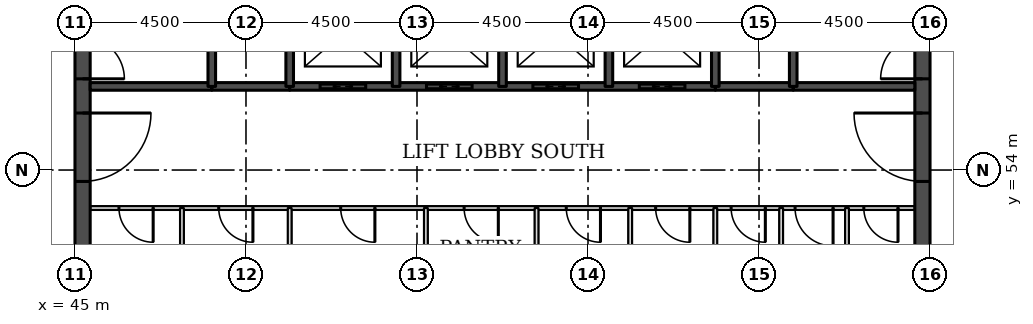
"""IFC4 building model, lengths in metres.
Left out: names, types, materials, properties, quantities, classifications, styles, units other than length and angle.
Written with IfcOpenShell. Run it as: python <this file> out.ifc"""

import sys

from ifc_helpers import new_model, si_unit, direction, frame, frame_2d, origin, place, context, subcontext, project, spatial, rectangle, extrude, element, fill, save


model = new_model("IFC4")
c1 = context("Model", 3, precision=1e-05, world=origin(), true_north=direction((0.0, 1.0)))
c2 = subcontext(c1, "Body", "Model", "MODEL_VIEW")
j1 = project(units=[si_unit("LENGTHUNIT", "METRE"), si_unit("PLANEANGLEUNIT", "RADIAN")], contexts=[c1])
p1 = place(None, origin())
s1 = spatial("IfcSite", under=j1, at=p1, CompositionType="ELEMENT")
p2 = place(p1, origin())
s2 = spatial("IfcBuilding", under=s1, at=p2, CompositionType="ELEMENT")
p3 = place(p2, frame((0.0, 0.0, 162.5)))
s3 = spatial("IfcBuildingStorey", under=s2, at=p3, CompositionType="ELEMENT", Elevation=162.5)
p4 = place(p3, frame((45.2, 49.5, 0.0), z_axis=(0.0, 0.0, 1.0), x_axis=(0.0, 1.0, 0.0)))
e1 = element("IfcWall", 1, at=p4, inside=s3, PredefinedType="SHEAR", context=c2, shape_type="SweptSolid", body=[
    extrude(rectangle(XDim=22.5, YDim=0.4, at=frame_2d((11.25, 0.0))), origin(), (0.0, 0.0, 1.0), 3.7),
])
p5 = place(p4, frame((4.2, 0.0, 0.0)))
e2 = element("IfcOpeningElement", 2, at=p5, cuts=e1, PredefinedType="OPENING", context=c2, shape_type="SweptSolid", body=[
    extrude(rectangle(XDim=1.8, YDim=2.1, at=frame_2d((0.9, 1.05))), frame((0.0, 0.21, 0.0), z_axis=(0.0, -1.0, 0.0), x_axis=(1.0, 0.0, 0.0)), (0.0, 0.0, 1.0), 0.42),
])
p6 = place(p4, frame((6.9, 0.0, 0.0)))
e3 = element("IfcOpeningElement", 3, at=p6, cuts=e1, PredefinedType="OPENING", context=c2, shape_type="SweptSolid", body=[
    extrude(rectangle(XDim=1.1, YDim=2.1, at=frame_2d((0.55, 1.05))), frame((0.0, 0.21, 0.0), z_axis=(0.0, -1.0, 0.0), x_axis=(1.0, 0.0, 0.0)), (0.0, 0.0, 1.0), 0.42),
])
p7 = place(p4, frame((13.6, 0.0, 0.0)))
e4 = element("IfcOpeningElement", 4, at=p7, cuts=e1, PredefinedType="OPENING", context=c2, shape_type="SweptSolid", body=[
    extrude(rectangle(XDim=1.1, YDim=2.1, at=frame_2d((0.55, 1.05))), frame((0.0, 0.21, 0.0), z_axis=(0.0, -1.0, 0.0), x_axis=(1.0, 0.0, 0.0)), (0.0, 0.0, 1.0), 0.42),
])
p8 = place(p4, frame((16.5, 0.0, 0.0)))
e5 = element("IfcOpeningElement", 5, at=p8, cuts=e1, PredefinedType="OPENING", context=c2, shape_type="SweptSolid", body=[
    extrude(rectangle(XDim=1.8, YDim=2.1, at=frame_2d((0.9, 1.05))), frame((0.0, 0.21, 0.0), z_axis=(0.0, -1.0, 0.0), x_axis=(1.0, 0.0, 0.0)), (0.0, 0.0, 1.0), 0.42),
])
p9 = place(p3, frame((67.3, 49.5, 0.0), z_axis=(0.0, 0.0, 1.0), x_axis=(0.0, 1.0, 0.0)))
e6 = element("IfcWall", 6, at=p9, inside=s3, PredefinedType="SHEAR", context=c2, shape_type="SweptSolid", body=[
    extrude(rectangle(XDim=22.5, YDim=0.4, at=frame_2d((11.25, 0.0))), origin(), (0.0, 0.0, 1.0), 3.7),
])
p10 = place(p9, frame((4.2, 0.0, 0.0)))
e7 = element("IfcOpeningElement", 7, at=p10, cuts=e6, PredefinedType="OPENING", context=c2, shape_type="SweptSolid", body=[
    extrude(rectangle(XDim=1.8, YDim=2.1, at=frame_2d((0.9, 1.05))), frame((0.0, 0.21, 0.0), z_axis=(0.0, -1.0, 0.0), x_axis=(1.0, 0.0, 0.0)), (0.0, 0.0, 1.0), 0.42),
])
p11 = place(p9, frame((6.9, 0.0, 0.0)))
e8 = element("IfcOpeningElement", 8, at=p11, cuts=e6, PredefinedType="OPENING", context=c2, shape_type="SweptSolid", body=[
    extrude(rectangle(XDim=1.1, YDim=2.1, at=frame_2d((0.55, 1.05))), frame((0.0, 0.21, 0.0), z_axis=(0.0, -1.0, 0.0), x_axis=(1.0, 0.0, 0.0)), (0.0, 0.0, 1.0), 0.42),
])
p12 = place(p9, frame((13.6, 0.0, 0.0)))
e9 = element("IfcOpeningElement", 9, at=p12, cuts=e6, PredefinedType="OPENING", context=c2, shape_type="SweptSolid", body=[
    extrude(rectangle(XDim=1.1, YDim=2.1, at=frame_2d((0.55, 1.05))), frame((0.0, 0.21, 0.0), z_axis=(0.0, -1.0, 0.0), x_axis=(1.0, 0.0, 0.0)), (0.0, 0.0, 1.0), 0.42),
])
p13 = place(p9, frame((16.5, 0.0, 0.0)))
e10 = element("IfcOpeningElement", 10, at=p13, cuts=e6, PredefinedType="OPENING", context=c2, shape_type="SweptSolid", body=[
    extrude(rectangle(XDim=1.8, YDim=2.1, at=frame_2d((0.9, 1.05))), frame((0.0, 0.21, 0.0), z_axis=(0.0, -1.0, 0.0), x_axis=(1.0, 0.0, 0.0)), (0.0, 0.0, 1.0), 0.42),
])
p14 = place(p3, frame((45.4, 53.0, 0.0), z_axis=(0.0, 0.0, 1.0), x_axis=(1.0, 0.0, 0.0)))
e11 = element("IfcWall", 11, at=p14, inside=s3, PredefinedType="PARTITIONING", context=c2, shape_type="SweptSolid", body=[
    extrude(rectangle(XDim=21.7, YDim=0.1, at=frame_2d((10.85, 0.0))), origin(), (0.0, 0.0, 1.0), 3.55),
])
p15 = place(p14, frame((20.357, 0.0, 0.0)))
e12 = element("IfcOpeningElement", 12, at=p15, cuts=e11, PredefinedType="OPENING", context=c2, shape_type="SweptSolid", body=[
    extrude(rectangle(XDim=0.9, YDim=2.1, at=frame_2d((0.45, 1.05))), frame((0.0, 0.06, 0.0), z_axis=(0.0, -1.0, 0.0), x_axis=(1.0, 0.0, 0.0)), (0.0, 0.0, 1.0), 0.12),
])
p16 = place(p14, frame((18.549, 0.0, 0.0)))
e13 = element("IfcOpeningElement", 13, at=p16, cuts=e11, PredefinedType="OPENING", context=c2, shape_type="SweptSolid", body=[
    extrude(rectangle(XDim=1.0, YDim=2.1, at=frame_2d((0.5, 1.05))), frame((0.0, 0.06, 0.0), z_axis=(0.0, -1.0, 0.0), x_axis=(1.0, 0.0, 0.0)), (0.0, 0.0, 1.0), 0.12),
])
p17 = place(p14, frame((16.866, 0.0, 0.0)))
e14 = element("IfcOpeningElement", 14, at=p17, cuts=e11, PredefinedType="OPENING", context=c2, shape_type="SweptSolid", body=[
    extrude(rectangle(XDim=0.9, YDim=2.1, at=frame_2d((0.45, 1.05))), frame((0.0, 0.06, 0.0), z_axis=(0.0, -1.0, 0.0), x_axis=(1.0, 0.0, 0.0)), (0.0, 0.0, 1.0), 0.12),
])
p18 = place(p14, frame((0.758, 0.0, 0.0)))
e15 = element("IfcOpeningElement", 15, at=p18, cuts=e11, PredefinedType="OPENING", context=c2, shape_type="SweptSolid", body=[
    extrude(rectangle(XDim=0.9, YDim=2.1, at=frame_2d((0.45, 1.05))), frame((0.0, 0.06, 0.0), z_axis=(0.0, -1.0, 0.0), x_axis=(1.0, 0.0, 0.0)), (0.0, 0.0, 1.0), 0.12),
])
p19 = place(p14, frame((3.383, 0.0, 0.0)))
e16 = element("IfcOpeningElement", 16, at=p19, cuts=e11, PredefinedType="OPENING", context=c2, shape_type="SweptSolid", body=[
    extrude(rectangle(XDim=0.9, YDim=2.1, at=frame_2d((0.45, 1.05))), frame((0.0, 0.06, 0.0), z_axis=(0.0, -1.0, 0.0), x_axis=(1.0, 0.0, 0.0)), (0.0, 0.0, 1.0), 0.12),
])
p20 = place(p14, frame((6.592, 0.0, 0.0)))
e17 = element("IfcOpeningElement", 17, at=p20, cuts=e11, PredefinedType="OPENING", context=c2, shape_type="SweptSolid", body=[
    extrude(rectangle(XDim=0.9, YDim=2.1, at=frame_2d((0.45, 1.05))), frame((0.0, 0.06, 0.0), z_axis=(0.0, -1.0, 0.0), x_axis=(1.0, 0.0, 0.0)), (0.0, 0.0, 1.0), 0.12),
])
p21 = place(p14, frame((9.84, 0.0, 0.0)))
e18 = element("IfcOpeningElement", 18, at=p21, cuts=e11, PredefinedType="OPENING", context=c2, shape_type="SweptSolid", body=[
    extrude(rectangle(XDim=0.9, YDim=2.1, at=frame_2d((0.45, 1.05))), frame((0.0, 0.06, 0.0), z_axis=(0.0, -1.0, 0.0), x_axis=(1.0, 0.0, 0.0)), (0.0, 0.0, 1.0), 0.12),
])
p22 = place(p14, frame((12.528, 0.0, 0.0)))
e19 = element("IfcOpeningElement", 19, at=p22, cuts=e11, PredefinedType="OPENING", context=c2, shape_type="SweptSolid", body=[
    extrude(rectangle(XDim=0.9, YDim=2.1, at=frame_2d((0.45, 1.05))), frame((0.0, 0.06, 0.0), z_axis=(0.0, -1.0, 0.0), x_axis=(1.0, 0.0, 0.0)), (0.0, 0.0, 1.0), 0.12),
])
p23 = place(p14, frame((14.88, 0.0, 0.0)))
e20 = element("IfcOpeningElement", 20, at=p23, cuts=e11, PredefinedType="OPENING", context=c2, shape_type="SweptSolid", body=[
    extrude(rectangle(XDim=0.9, YDim=2.1, at=frame_2d((0.45, 1.05))), frame((0.0, 0.06, 0.0), z_axis=(0.0, -1.0, 0.0), x_axis=(1.0, 0.0, 0.0)), (0.0, 0.0, 1.0), 0.12),
])
for number, where, z_axis, x_axis in (
    (21, (48.6, 56.2, 0.0), (0.0, 0.0, 1.0), (1.0, 0.0, 0.0)),
    (22, (61.85, 56.2, 0.0), (0.0, 0.0, 1.0), (1.0, 0.0, 0.0)),
):
    element("IfcWall", number, at=place(p3, frame(where, z_axis=z_axis, x_axis=x_axis)), inside=s3, PredefinedType="SOLIDWALL", context=c2, shape_type="SweptSolid", body=[
        extrude(rectangle(XDim=2.05, YDim=0.2, at=frame_2d((1.025, 0.0))), origin(), (0.0, 0.0, 1.0), 3.55),
    ])
p24 = place(p3, frame((45.4, 56.2, 0.0), z_axis=(0.0, 0.0, 1.0), x_axis=(1.0, 0.0, 0.0)))
e23 = element("IfcWall", 23, at=p24, inside=s3, PredefinedType="SOLIDWALL", context=c2, shape_type="SweptSolid", body=[
    extrude(rectangle(XDim=3.2, YDim=0.2, at=frame_2d((1.6, 0.0))), origin(), (0.0, 0.0, 1.0), 3.55),
])
p25 = place(p3, frame((50.65, 56.2, 0.0), z_axis=(0.0, 0.0, 1.0), x_axis=(1.0, 0.0, 0.0)))
e24 = element("IfcWall", 24, at=p25, inside=s3, PredefinedType="SOLIDWALL", context=c2, shape_type="SweptSolid", body=[
    extrude(rectangle(XDim=11.2, YDim=0.2, at=frame_2d((5.6, 0.0))), origin(), (0.0, 0.0, 1.0), 3.55),
])
p26 = place(p25, frame((0.8, 0.0, 0.0)))
e25 = element("IfcOpeningElement", 25, at=p26, cuts=e24, PredefinedType="OPENING", context=c2, shape_type="SweptSolid", body=[
    extrude(rectangle(XDim=1.2, YDim=2.1, at=frame_2d((0.6, 1.05))), frame((0.0, 0.11, 0.0), z_axis=(0.0, -1.0, 0.0), x_axis=(1.0, 0.0, 0.0)), (0.0, 0.0, 1.0), 0.22),
])
p27 = place(p25, frame((3.6, 0.0, 0.0)))
e26 = element("IfcOpeningElement", 26, at=p27, cuts=e24, PredefinedType="OPENING", context=c2, shape_type="SweptSolid", body=[
    extrude(rectangle(XDim=1.2, YDim=2.1, at=frame_2d((0.6, 1.05))), frame((0.0, 0.11, 0.0), z_axis=(0.0, -1.0, 0.0), x_axis=(1.0, 0.0, 0.0)), (0.0, 0.0, 1.0), 0.22),
])
p28 = place(p25, frame((6.4, 0.0, 0.0)))
e27 = element("IfcOpeningElement", 27, at=p28, cuts=e24, PredefinedType="OPENING", context=c2, shape_type="SweptSolid", body=[
    extrude(rectangle(XDim=1.2, YDim=2.1, at=frame_2d((0.6, 1.05))), frame((0.0, 0.11, 0.0), z_axis=(0.0, -1.0, 0.0), x_axis=(1.0, 0.0, 0.0)), (0.0, 0.0, 1.0), 0.22),
])
p29 = place(p25, frame((9.2, 0.0, 0.0)))
e28 = element("IfcOpeningElement", 28, at=p29, cuts=e24, PredefinedType="OPENING", context=c2, shape_type="SweptSolid", body=[
    extrude(rectangle(XDim=1.2, YDim=2.1, at=frame_2d((0.6, 1.05))), frame((0.0, 0.11, 0.0), z_axis=(0.0, -1.0, 0.0), x_axis=(1.0, 0.0, 0.0)), (0.0, 0.0, 1.0), 0.22),
])
p30 = place(p3, frame((63.9, 56.2, 0.0), z_axis=(0.0, 0.0, 1.0), x_axis=(1.0, 0.0, 0.0)))
e29 = element("IfcWall", 29, at=p30, inside=s3, PredefinedType="SOLIDWALL", context=c2, shape_type="SweptSolid", body=[
    extrude(rectangle(XDim=3.2, YDim=0.2, at=frame_2d((1.6, 0.0))), origin(), (0.0, 0.0, 1.0), 3.55),
])
p31 = place(p3, frame((47.815, 49.9, 0.0), z_axis=(0.0, 0.0, 1.0), x_axis=(0.0, 1.0, 0.0)))
e30 = element("IfcWall", 30, at=p31, inside=s3, PredefinedType="PARTITIONING", context=c2, shape_type="SweptSolid", body=[
    extrude(rectangle(XDim=3.1, YDim=0.1, at=frame_2d((1.55, 0.0))), origin(), (0.0, 0.0, 1.0), 3.55),
])
p32 = place(p3, frame((48.6, 56.2, 0.0), z_axis=(0.0, 0.0, 1.0), x_axis=(0.0, 1.0, 0.0)))
e31 = element("IfcWall", 31, at=p32, inside=s3, PredefinedType="SOLIDWALL", context=c2, shape_type="SweptSolid", body=[
    extrude(rectangle(XDim=5.8, YDim=0.2, at=frame_2d((2.9, 0.0))), origin(), (0.0, 0.0, 1.0), 3.55),
])
p33 = place(p3, frame((50.65, 49.9, 0.0), z_axis=(0.0, 0.0, 1.0), x_axis=(0.0, 1.0, 0.0)))
e32 = element("IfcWall", 32, at=p33, inside=s3, PredefinedType="PARTITIONING", context=c2, shape_type="SweptSolid", body=[
    extrude(rectangle(XDim=3.1, YDim=0.1, at=frame_2d((1.55, 0.0))), origin(), (0.0, 0.0, 1.0), 3.55),
])
for number, where, z_axis, x_axis in (
    (33, (50.65, 56.2, 0.0), (0.0, 0.0, 1.0), (0.0, 1.0, 0.0)),
    (34, (53.45, 56.2, 0.0), (0.0, 0.0, 1.0), (0.0, 1.0, 0.0)),
):
    element("IfcWall", number, at=place(p3, frame(where, z_axis=z_axis, x_axis=x_axis)), inside=s3, PredefinedType="SOLIDWALL", context=c2, shape_type="SweptSolid", body=[
        extrude(rectangle(XDim=2.8, YDim=0.2, at=frame_2d((1.4, 0.0))), origin(), (0.0, 0.0, 1.0), 3.55),
    ])
p34 = place(p3, frame((54.234, 49.9, 0.0), z_axis=(0.0, 0.0, 1.0), x_axis=(0.0, 1.0, 0.0)))
e35 = element("IfcWall", 35, at=p34, inside=s3, PredefinedType="PARTITIONING", context=c2, shape_type="SweptSolid", body=[
    extrude(rectangle(XDim=3.1, YDim=0.1, at=frame_2d((1.55, 0.0))), origin(), (0.0, 0.0, 1.0), 3.55),
])
p35 = place(p3, frame((56.25, 56.2, 0.0), z_axis=(0.0, 0.0, 1.0), x_axis=(0.0, 1.0, 0.0)))
e36 = element("IfcWall", 36, at=p35, inside=s3, PredefinedType="SOLIDWALL", context=c2, shape_type="SweptSolid", body=[
    extrude(rectangle(XDim=2.8, YDim=0.2, at=frame_2d((1.4, 0.0))), origin(), (0.0, 0.0, 1.0), 3.55),
])
p36 = place(p3, frame((57.146, 49.9, 0.0), z_axis=(0.0, 0.0, 1.0), x_axis=(0.0, 1.0, 0.0)))
e37 = element("IfcWall", 37, at=p36, inside=s3, PredefinedType="PARTITIONING", context=c2, shape_type="SweptSolid", body=[
    extrude(rectangle(XDim=3.1, YDim=0.1, at=frame_2d((1.55, 0.0))), origin(), (0.0, 0.0, 1.0), 3.55),
])
p37 = place(p3, frame((59.05, 56.2, 0.0), z_axis=(0.0, 0.0, 1.0), x_axis=(0.0, 1.0, 0.0)))
e38 = element("IfcWall", 38, at=p37, inside=s3, PredefinedType="SOLIDWALL", context=c2, shape_type="SweptSolid", body=[
    extrude(rectangle(XDim=2.8, YDim=0.2, at=frame_2d((1.4, 0.0))), origin(), (0.0, 0.0, 1.0), 3.55),
])
for number, where, z_axis, x_axis in (
    (39, (59.61, 49.9, 0.0), (0.0, 0.0, 1.0), (0.0, 1.0, 0.0)),
    (40, (61.85, 49.9, 0.0), (0.0, 0.0, 1.0), (0.0, 1.0, 0.0)),
):
    element("IfcWall", number, at=place(p3, frame(where, z_axis=z_axis, x_axis=x_axis)), inside=s3, PredefinedType="PARTITIONING", context=c2, shape_type="SweptSolid", body=[
        extrude(rectangle(XDim=3.1, YDim=0.1, at=frame_2d((1.55, 0.0))), origin(), (0.0, 0.0, 1.0), 3.55),
    ])
p38 = place(p3, frame((61.85, 56.2, 0.0), z_axis=(0.0, 0.0, 1.0), x_axis=(0.0, 1.0, 0.0)))
e41 = element("IfcWall", 41, at=p38, inside=s3, PredefinedType="SOLIDWALL", context=c2, shape_type="SweptSolid", body=[
    extrude(rectangle(XDim=2.8, YDim=0.2, at=frame_2d((1.4, 0.0))), origin(), (0.0, 0.0, 1.0), 3.55),
])
p39 = place(p3, frame((63.583, 49.9, 0.0), z_axis=(0.0, 0.0, 1.0), x_axis=(0.0, 1.0, 0.0)))
e42 = element("IfcWall", 42, at=p39, inside=s3, PredefinedType="PARTITIONING", context=c2, shape_type="SweptSolid", body=[
    extrude(rectangle(XDim=3.1, YDim=0.1, at=frame_2d((1.55, 0.0))), origin(), (0.0, 0.0, 1.0), 3.55),
])
p40 = place(p3, frame((63.9, 56.2, 0.0), z_axis=(0.0, 0.0, 1.0), x_axis=(0.0, 1.0, 0.0)))
e43 = element("IfcWall", 43, at=p40, inside=s3, PredefinedType="SOLIDWALL", context=c2, shape_type="SweptSolid", body=[
    extrude(rectangle(XDim=5.8, YDim=0.2, at=frame_2d((2.9, 0.0))), origin(), (0.0, 0.0, 1.0), 3.55),
])
p41 = place(p3, frame((65.315, 49.9, 0.0), z_axis=(0.0, 0.0, 1.0), x_axis=(0.0, 1.0, 0.0)))
e44 = element("IfcWall", 44, at=p41, inside=s3, PredefinedType="PARTITIONING", context=c2, shape_type="SweptSolid", body=[
    extrude(rectangle(XDim=3.1, YDim=0.1, at=frame_2d((1.55, 0.0))), origin(), (0.0, 0.0, 1.0), 3.55),
])
p42 = place(p26, origin())
e45 = element("IfcDoor", 45, at=p42, inside=s3, OperationType="DOUBLE_DOOR_SLIDING", PredefinedType="DOOR", context=c2, shape_type="SweptSolid", body=[
    extrude(rectangle(XDim=1.2, YDim=2.1, at=frame_2d((0.6, 1.05))), frame((0.0, 0.025, 0.0), z_axis=(0.0, -1.0, 0.0), x_axis=(1.0, 0.0, 0.0)), (0.0, 0.0, 1.0), 0.05),
])
fill(e25, e45)
p43 = place(p27, origin())
e46 = element("IfcDoor", 46, at=p43, inside=s3, OperationType="DOUBLE_DOOR_SLIDING", PredefinedType="DOOR", context=c2, shape_type="SweptSolid", body=[
    extrude(rectangle(XDim=1.2, YDim=2.1, at=frame_2d((0.6, 1.05))), frame((0.0, 0.025, 0.0), z_axis=(0.0, -1.0, 0.0), x_axis=(1.0, 0.0, 0.0)), (0.0, 0.0, 1.0), 0.05),
])
fill(e26, e46)
p44 = place(p28, origin())
e47 = element("IfcDoor", 47, at=p44, inside=s3, OperationType="DOUBLE_DOOR_SLIDING", PredefinedType="DOOR", context=c2, shape_type="SweptSolid", body=[
    extrude(rectangle(XDim=1.2, YDim=2.1, at=frame_2d((0.6, 1.05))), frame((0.0, 0.025, 0.0), z_axis=(0.0, -1.0, 0.0), x_axis=(1.0, 0.0, 0.0)), (0.0, 0.0, 1.0), 0.05),
])
fill(e27, e47)
p45 = place(p29, origin())
e48 = element("IfcDoor", 48, at=p45, inside=s3, OperationType="DOUBLE_DOOR_SLIDING", PredefinedType="DOOR", context=c2, shape_type="SweptSolid", body=[
    extrude(rectangle(XDim=1.2, YDim=2.1, at=frame_2d((0.6, 1.05))), frame((0.0, 0.025, 0.0), z_axis=(0.0, -1.0, 0.0), x_axis=(1.0, 0.0, 0.0)), (0.0, 0.0, 1.0), 0.05),
])
fill(e28, e48)
p46 = place(p5, frame((1.8, 0.0, 0.0), z_axis=(0.0, 0.0, 1.0), x_axis=(-1.0, 0.0, 0.0)))
e49 = element("IfcDoor", 49, at=p46, inside=s3, OperationType="SINGLE_SWING_LEFT", PredefinedType="DOOR", context=c2, shape_type="SweptSolid", body=[
    extrude(rectangle(XDim=1.8, YDim=2.1, at=frame_2d((0.9, 1.05))), frame((0.0, 0.025, 0.0), z_axis=(0.0, -1.0, 0.0), x_axis=(1.0, 0.0, 0.0)), (0.0, 0.0, 1.0), 0.05),
])
fill(e2, e49)
p47 = place(p6, frame((1.1, 0.0, 0.0), z_axis=(0.0, 0.0, 1.0), x_axis=(-1.0, 0.0, 0.0)))
e50 = element("IfcDoor", 50, at=p47, inside=s3, OperationType="SINGLE_SWING_RIGHT", PredefinedType="DOOR", context=c2, shape_type="SweptSolid", body=[
    extrude(rectangle(XDim=1.1, YDim=2.1, at=frame_2d((0.55, 1.05))), frame((0.0, 0.025, 0.0), z_axis=(0.0, -1.0, 0.0), x_axis=(1.0, 0.0, 0.0)), (0.0, 0.0, 1.0), 0.05),
])
fill(e3, e50)
p48 = place(p10, origin())
e51 = element("IfcDoor", 51, at=p48, inside=s3, OperationType="SINGLE_SWING_RIGHT", PredefinedType="DOOR", context=c2, shape_type="SweptSolid", body=[
    extrude(rectangle(XDim=1.8, YDim=2.1, at=frame_2d((0.9, 1.05))), frame((0.0, 0.025, 0.0), z_axis=(0.0, -1.0, 0.0), x_axis=(1.0, 0.0, 0.0)), (0.0, 0.0, 1.0), 0.05),
])
fill(e7, e51)
p49 = place(p11, origin())
e52 = element("IfcDoor", 52, at=p49, inside=s3, OperationType="SINGLE_SWING_LEFT", PredefinedType="DOOR", context=c2, shape_type="SweptSolid", body=[
    extrude(rectangle(XDim=1.1, YDim=2.1, at=frame_2d((0.55, 1.05))), frame((0.0, 0.025, 0.0), z_axis=(0.0, -1.0, 0.0), x_axis=(1.0, 0.0, 0.0)), (0.0, 0.0, 1.0), 0.05),
])
fill(e8, e52)
p50 = place(p15, frame((0.9, 0.0, 0.0), z_axis=(0.0, 0.0, 1.0), x_axis=(-1.0, 0.0, 0.0)))
e53 = element("IfcDoor", 53, at=p50, inside=s3, OperationType="SINGLE_SWING_LEFT", PredefinedType="DOOR", context=c2, shape_type="SweptSolid", body=[
    extrude(rectangle(XDim=0.9, YDim=2.1, at=frame_2d((0.45, 1.05))), frame((0.0, 0.025, 0.0), z_axis=(0.0, -1.0, 0.0), x_axis=(1.0, 0.0, 0.0)), (0.0, 0.0, 1.0), 0.05),
])
fill(e12, e53)
p51 = place(p16, frame((1.0, 0.0, 0.0), z_axis=(0.0, 0.0, 1.0), x_axis=(-1.0, 0.0, 0.0)))
e54 = element("IfcDoor", 54, at=p51, inside=s3, OperationType="SINGLE_SWING_LEFT", PredefinedType="DOOR", context=c2, shape_type="SweptSolid", body=[
    extrude(rectangle(XDim=1.0, YDim=2.1, at=frame_2d((0.5, 1.05))), frame((0.0, 0.025, 0.0), z_axis=(0.0, -1.0, 0.0), x_axis=(1.0, 0.0, 0.0)), (0.0, 0.0, 1.0), 0.05),
])
fill(e13, e54)
p52 = place(p17, frame((0.9, 0.0, 0.0), z_axis=(0.0, 0.0, 1.0), x_axis=(-1.0, 0.0, 0.0)))
e55 = element("IfcDoor", 55, at=p52, inside=s3, OperationType="SINGLE_SWING_LEFT", PredefinedType="DOOR", context=c2, shape_type="SweptSolid", body=[
    extrude(rectangle(XDim=0.9, YDim=2.1, at=frame_2d((0.45, 1.05))), frame((0.0, 0.025, 0.0), z_axis=(0.0, -1.0, 0.0), x_axis=(1.0, 0.0, 0.0)), (0.0, 0.0, 1.0), 0.05),
])
fill(e14, e55)
p53 = place(p18, frame((0.9, 0.0, 0.0), z_axis=(0.0, 0.0, 1.0), x_axis=(-1.0, 0.0, 0.0)))
e56 = element("IfcDoor", 56, at=p53, inside=s3, OperationType="SINGLE_SWING_LEFT", PredefinedType="DOOR", context=c2, shape_type="SweptSolid", body=[
    extrude(rectangle(XDim=0.9, YDim=2.1, at=frame_2d((0.45, 1.05))), frame((0.0, 0.025, 0.0), z_axis=(0.0, -1.0, 0.0), x_axis=(1.0, 0.0, 0.0)), (0.0, 0.0, 1.0), 0.05),
])
fill(e15, e56)
p54 = place(p19, frame((0.9, 0.0, 0.0), z_axis=(0.0, 0.0, 1.0), x_axis=(-1.0, 0.0, 0.0)))
e57 = element("IfcDoor", 57, at=p54, inside=s3, OperationType="SINGLE_SWING_LEFT", PredefinedType="DOOR", context=c2, shape_type="SweptSolid", body=[
    extrude(rectangle(XDim=0.9, YDim=2.1, at=frame_2d((0.45, 1.05))), frame((0.0, 0.025, 0.0), z_axis=(0.0, -1.0, 0.0), x_axis=(1.0, 0.0, 0.0)), (0.0, 0.0, 1.0), 0.05),
])
fill(e16, e57)
p55 = place(p20, frame((0.9, 0.0, 0.0), z_axis=(0.0, 0.0, 1.0), x_axis=(-1.0, 0.0, 0.0)))
e58 = element("IfcDoor", 58, at=p55, inside=s3, OperationType="SINGLE_SWING_LEFT", PredefinedType="DOOR", context=c2, shape_type="SweptSolid", body=[
    extrude(rectangle(XDim=0.9, YDim=2.1, at=frame_2d((0.45, 1.05))), frame((0.0, 0.025, 0.0), z_axis=(0.0, -1.0, 0.0), x_axis=(1.0, 0.0, 0.0)), (0.0, 0.0, 1.0), 0.05),
])
fill(e17, e58)
p56 = place(p21, frame((0.9, 0.0, 0.0), z_axis=(0.0, 0.0, 1.0), x_axis=(-1.0, 0.0, 0.0)))
e59 = element("IfcDoor", 59, at=p56, inside=s3, OperationType="SINGLE_SWING_LEFT", PredefinedType="DOOR", context=c2, shape_type="SweptSolid", body=[
    extrude(rectangle(XDim=0.9, YDim=2.1, at=frame_2d((0.45, 1.05))), frame((0.0, 0.025, 0.0), z_axis=(0.0, -1.0, 0.0), x_axis=(1.0, 0.0, 0.0)), (0.0, 0.0, 1.0), 0.05),
])
fill(e18, e59)
p57 = place(p22, frame((0.9, 0.0, 0.0), z_axis=(0.0, 0.0, 1.0), x_axis=(-1.0, 0.0, 0.0)))
e60 = element("IfcDoor", 60, at=p57, inside=s3, OperationType="SINGLE_SWING_LEFT", PredefinedType="DOOR", context=c2, shape_type="SweptSolid", body=[
    extrude(rectangle(XDim=0.9, YDim=2.1, at=frame_2d((0.45, 1.05))), frame((0.0, 0.025, 0.0), z_axis=(0.0, -1.0, 0.0), x_axis=(1.0, 0.0, 0.0)), (0.0, 0.0, 1.0), 0.05),
])
fill(e19, e60)
p58 = place(p23, frame((0.9, 0.0, 0.0), z_axis=(0.0, 0.0, 1.0), x_axis=(-1.0, 0.0, 0.0)))
e61 = element("IfcDoor", 61, at=p58, inside=s3, OperationType="SINGLE_SWING_LEFT", PredefinedType="DOOR", context=c2, shape_type="SweptSolid", body=[
    extrude(rectangle(XDim=0.9, YDim=2.1, at=frame_2d((0.45, 1.05))), frame((0.0, 0.025, 0.0), z_axis=(0.0, -1.0, 0.0), x_axis=(1.0, 0.0, 0.0)), (0.0, 0.0, 1.0), 0.05),
])
fill(e20, e61)
save(model, sys.argv[1])
